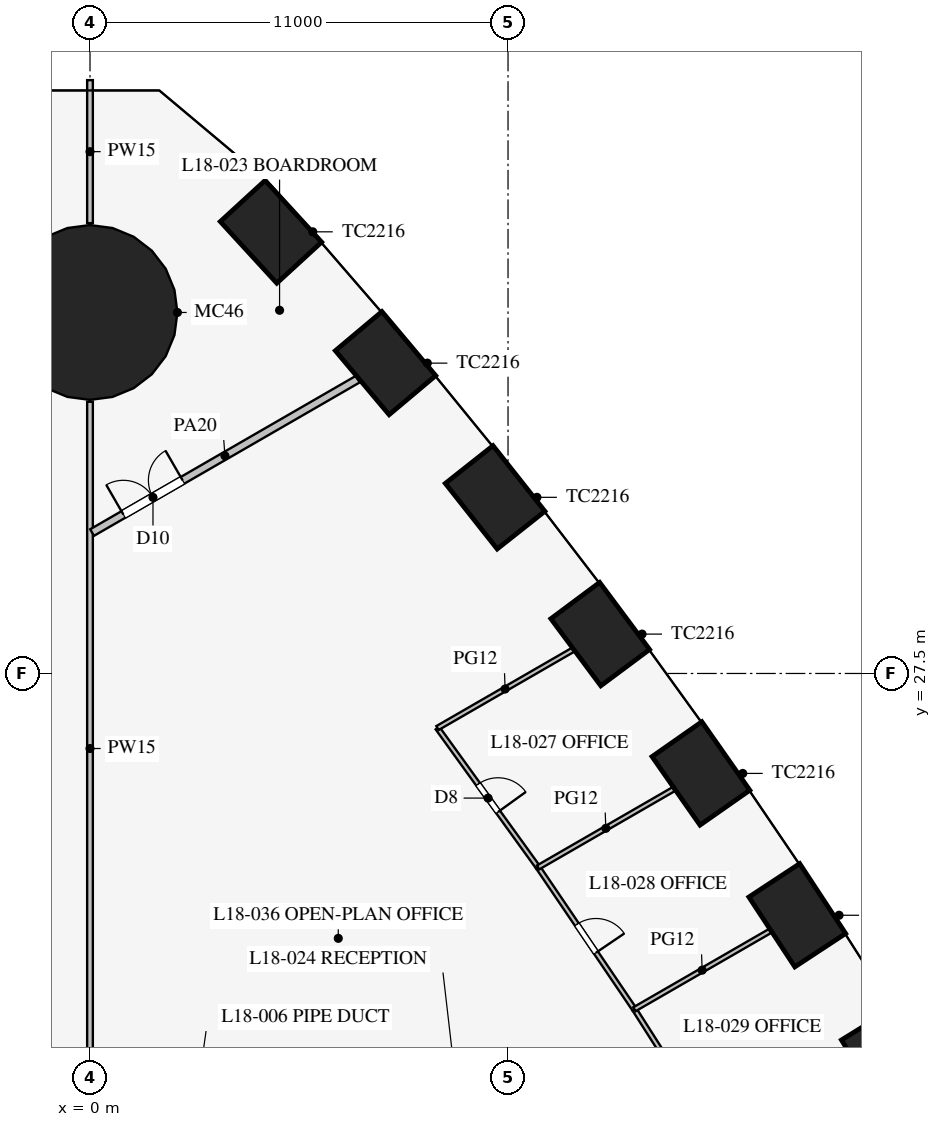
"""IFC4 building model, lengths in metres.
Left out: names, types, materials, properties, quantities, classifications, styles, units other than length and angle.
Written with IfcOpenShell. Run it as: python <this file> out.ifc"""

import sys

from ifc_helpers import new_model, si_unit, direction, frame, frame_2d, origin, origin_2d, place, context, subcontext, project, spatial, rectangle, circle, extrude, element, fill, save


model = new_model("IFC4")
c1 = context("Model", 3, precision=1e-05, world=origin(), true_north=direction((0.0, 1.0)))
c2 = subcontext(c1, "Body", "Model", "MODEL_VIEW")
j1 = project(units=[si_unit("LENGTHUNIT", "METRE"), si_unit("PLANEANGLEUNIT", "RADIAN")], contexts=[c1])
p1 = place(None, origin())
s1 = spatial("IfcSite", under=j1, at=p1, CompositionType="ELEMENT")
p2 = place(p1, origin())
s2 = spatial("IfcBuilding", under=s1, at=p2, CompositionType="ELEMENT")
p3 = place(p2, frame((0.0, 0.0, 79.5)))
s3 = spatial("IfcBuildingStorey", under=s2, at=p3, CompositionType="ELEMENT", Elevation=79.5)
for number, where, z_axis, x_axis in (
    (1, (21.031, 17.339, 0.0), (0.0, 0.0, 1.0), (-0.525, 0.851, 0.0)),
    (2, (18.611, 21.137, 0.0), (0.0, 0.0, 1.0), (-0.549, 0.836, 0.0)),
    (3, (16.076, 24.87, 0.0), (0.0, 0.0, 1.0), (-0.574, 0.819, 0.0)),
    (4, (13.426, 28.536, 0.0), (0.0, 0.0, 1.0), (-0.597, 0.802, 0.0)),
    (5, (10.66, 32.135, 0.0), (0.0, 0.0, 1.0), (-0.62, 0.784, 0.0)),
    (6, (7.776, 35.667, 0.0), (0.0, 0.0, 1.0), (-0.643, 0.766, 0.0)),
    (7, (4.762, 39.122, 0.0), (0.0, 0.0, 1.0), (-0.676, 0.737, 0.0)),
):
    element("IfcColumn", number, at=place(p3, frame(where, z_axis=z_axis, x_axis=x_axis)), inside=s3, PredefinedType="COLUMN", context=c2, shape_type="SweptSolid", body=[
        extrude(rectangle(XDim=2.2, YDim=1.6, at=origin_2d()), origin(), (0.0, 0.0, 1.0), 4.2),
    ])
p4 = place(p3, frame((0.0, 37.0, 0.0), z_axis=(0.0, 0.0, 1.0), x_axis=(1.0, 0.0, 0.0)))
e8 = element("IfcColumn", 8, at=p4, inside=s3, PredefinedType="COLUMN", context=c2, shape_type="SweptSolid", body=[
    extrude(circle(Radius=2.3, at=origin_2d()), origin(), (0.0, 0.0, 1.0), 4.2),
])
p5 = place(p3, frame((0.0, 16.4, 0.0), z_axis=(0.0, 0.0, 1.0), x_axis=(0.0, 1.0, 0.0)))
e9 = element("IfcWall", 9, at=p5, inside=s3, PredefinedType="PARTITIONING", context=c2, shape_type="SweptSolid", body=[
    extrude(rectangle(XDim=18.25, YDim=0.15, at=frame_2d((9.125, 0.0))), origin(), (0.0, 0.0, 1.0), 2.3),
])
p6 = place(p3, frame((0.0, 39.35, 0.0), z_axis=(0.0, 0.0, 1.0), x_axis=(0.0, 1.0, 0.0)))
e10 = element("IfcWall", 10, at=p6, inside=s3, PredefinedType="PARTITIONING", context=c2, shape_type="SweptSolid", body=[
    extrude(rectangle(XDim=3.764, YDim=0.15, at=frame_2d((1.882, 0.0))), origin(), (0.0, 0.0, 1.0), 2.3),
])
p7 = place(p3, frame((11.792, 22.396, 0.0), z_axis=(0.0, 0.0, 1.0), x_axis=(-0.585376255171, 0.810761765183, 0.0)))
e11 = element("IfcWall", 11, at=p7, inside=s3, PredefinedType="PARTITIONING", context=c2, shape_type="SweptSolid", body=[
    extrude(rectangle(XDim=4.523, YDim=0.12, at=frame_2d((2.262, 0.0))), origin(), (0.0, 0.0, 1.0), 2.9),
])
p8 = place(p7, frame((1.8, 0.0, 0.15)))
e12 = element("IfcOpeningElement", 12, at=p8, cuts=e11, PredefinedType="OPENING", context=c2, shape_type="SweptSolid", body=[
    extrude(rectangle(XDim=0.9, YDim=2.1, at=frame_2d((0.45, 1.05))), frame((0.0, 0.07, 0.0), z_axis=(0.0, -1.0, 0.0), x_axis=(1.0, 0.0, 0.0)), (0.0, 0.0, 1.0), 0.14),
])
p9 = place(p3, frame((16.745, 14.864, 0.0), z_axis=(0.0, 0.0, 1.0), x_axis=(-0.537205132487, 0.843451626135, 0.0)))
e13 = element("IfcWall", 13, at=p9, inside=s3, PredefinedType="PARTITIONING", context=c2, shape_type="SweptSolid", body=[
    extrude(rectangle(XDim=4.504, YDim=0.12, at=frame_2d((2.252, 0.0))), origin(), (0.0, 0.0, 1.0), 2.9),
])
p10 = place(p9, frame((1.8, 0.0, 0.15)))
e14 = element("IfcOpeningElement", 14, at=p10, cuts=e13, PredefinedType="OPENING", context=c2, shape_type="SweptSolid", body=[
    extrude(rectangle(XDim=0.9, YDim=2.1, at=frame_2d((0.45, 1.05))), frame((0.0, 0.07, 0.0), z_axis=(0.0, -1.0, 0.0), x_axis=(1.0, 0.0, 0.0)), (0.0, 0.0, 1.0), 0.14),
])
p11 = place(p3, frame((14.325, 18.663, 0.0), z_axis=(0.0, 0.0, 1.0), x_axis=(-0.561512004239, 0.827468591002, 0.0)))
e15 = element("IfcWall", 15, at=p11, inside=s3, PredefinedType="PARTITIONING", context=c2, shape_type="SweptSolid", body=[
    extrude(rectangle(XDim=4.512, YDim=0.12, at=frame_2d((2.256, 0.0))), origin(), (0.0, 0.0, 1.0), 2.9),
])
p12 = place(p11, frame((1.8, 0.0, 0.15)))
e16 = element("IfcOpeningElement", 16, at=p12, cuts=e15, PredefinedType="OPENING", context=c2, shape_type="SweptSolid", body=[
    extrude(rectangle(XDim=0.9, YDim=2.1, at=frame_2d((0.45, 1.05))), frame((0.0, 0.07, 0.0), z_axis=(0.0, -1.0, 0.0), x_axis=(1.0, 0.0, 0.0)), (0.0, 0.0, 1.0), 0.14),
])
p13 = place(p3, frame((11.792, 22.396, 0.0), z_axis=(0.0, 0.0, 1.0), x_axis=(0.865991869213, 0.500058079084, 0.0)))
e17 = element("IfcWall", 17, at=p13, inside=s3, PredefinedType="PARTITIONING", context=c2, shape_type="SweptSolid", body=[
    extrude(rectangle(XDim=4.114, YDim=0.12, at=frame_2d((2.057, 0.0))), origin(), (0.0, 0.0, 1.0), 2.6),
])
p14 = place(p3, frame((9.144, 26.064, 0.0), z_axis=(0.0, 0.0, 1.0), x_axis=(0.866022320763, 0.500005339912, 0.0)))
e18 = element("IfcWall", 18, at=p14, inside=s3, PredefinedType="PARTITIONING", context=c2, shape_type="SweptSolid", body=[
    extrude(rectangle(XDim=4.109, YDim=0.12, at=frame_2d((2.054, 0.0))), origin(), (0.0, 0.0, 1.0), 2.6),
])
p15 = place(p3, frame((0.055, 31.209, 0.0), z_axis=(0.0, 0.0, 1.0), x_axis=(0.866027459735, 0.499996438971, 0.0)))
e19 = element("IfcWall", 19, at=p15, inside=s3, PredefinedType="PARTITIONING", context=c2, shape_type="SweptSolid", body=[
    extrude(rectangle(XDim=8.073, YDim=0.2, at=frame_2d((4.037, 0.0))), origin(), (0.0, 0.0, 1.0), 2.9),
])
p16 = place(p15, frame((0.95, 0.0, 0.15)))
e20 = element("IfcOpeningElement", 20, at=p16, cuts=e19, PredefinedType="OPENING", context=c2, shape_type="SweptSolid", body=[
    extrude(rectangle(XDim=1.8, YDim=2.1, at=frame_2d((0.9, 1.05))), frame((0.0, 0.11, 0.0), z_axis=(0.0, -1.0, 0.0), x_axis=(1.0, 0.0, 0.0)), (0.0, 0.0, 1.0), 0.22),
])
p17 = place(p3, frame((14.325, 18.663, 0.0), z_axis=(0.0, 0.0, 1.0), x_axis=(0.866030556495, 0.499991075137, 0.0)))
e21 = element("IfcWall", 21, at=p17, inside=s3, PredefinedType="PARTITIONING", context=c2, shape_type="SweptSolid", body=[
    extrude(rectangle(XDim=4.117, YDim=0.12, at=frame_2d((2.059, 0.0))), origin(), (0.0, 0.0, 1.0), 2.8),
])
p18 = place(p16, origin())
e22 = element("IfcDoor", 22, at=p18, inside=s3, OperationType="DOUBLE_DOOR_SINGLE_SWING", PredefinedType="DOOR", context=c2, shape_type="SweptSolid", body=[
    extrude(rectangle(XDim=1.8, YDim=2.1, at=frame_2d((0.9, 1.05))), frame((0.0, 0.025, 0.0), z_axis=(0.0, -1.0, 0.0), x_axis=(1.0, 0.0, 0.0)), (0.0, 0.0, 1.0), 0.05),
])
fill(e20, e22)
p19 = place(p8, frame((0.9, 0.0, 0.0), z_axis=(0.0, 0.0, 1.0), x_axis=(-1.0, 0.0, 0.0)))
e23 = element("IfcDoor", 23, at=p19, inside=s3, OperationType="SINGLE_SWING_RIGHT", PredefinedType="DOOR", context=c2, shape_type="SweptSolid", body=[
    extrude(rectangle(XDim=0.9, YDim=2.1, at=frame_2d((0.45, 1.05))), frame((0.0, 0.025, 0.0), z_axis=(0.0, -1.0, 0.0), x_axis=(1.0, 0.0, 0.0)), (0.0, 0.0, 1.0), 0.05),
])
fill(e12, e23)
p20 = place(p12, frame((0.9, 0.0, 0.0), z_axis=(0.0, 0.0, 1.0), x_axis=(-1.0, 0.0, 0.0)))
e24 = element("IfcDoor", 24, at=p20, inside=s3, OperationType="SINGLE_SWING_RIGHT", PredefinedType="DOOR", context=c2, shape_type="SweptSolid", body=[
    extrude(rectangle(XDim=0.9, YDim=2.1, at=frame_2d((0.45, 1.05))), frame((0.0, 0.025, 0.0), z_axis=(0.0, -1.0, 0.0), x_axis=(1.0, 0.0, 0.0)), (0.0, 0.0, 1.0), 0.05),
])
fill(e16, e24)
save(model, sys.argv[1])
